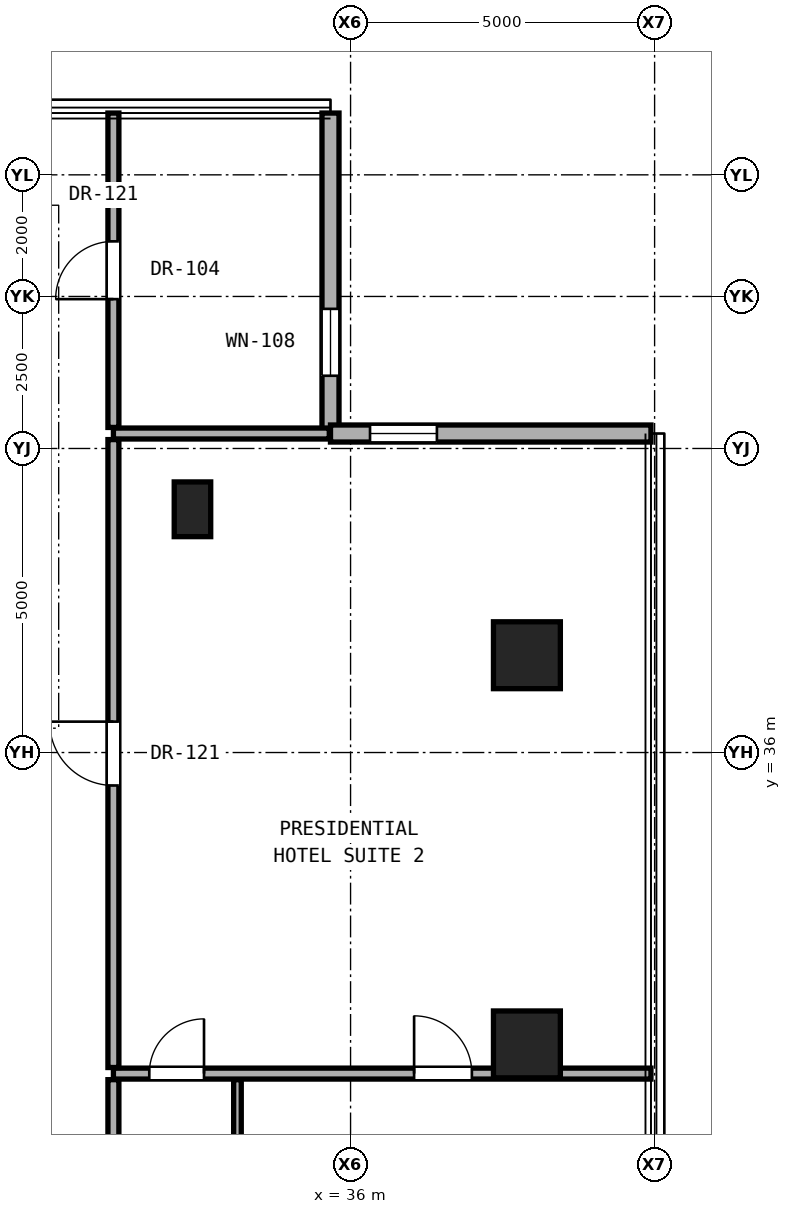
"""IFC4 building model, lengths in metres.
Left out: names, types, materials, properties, quantities, classifications, styles, units other than length and angle.
Written with IfcOpenShell. Run it as: python <this file> out.ifc"""

import sys

from ifc_helpers import new_model, si_unit, direction, frame, frame_2d, origin, origin_2d, place, context, subcontext, project, spatial, rectangle, hollow_rectangle, extrude, element, fill, save


model = new_model("IFC4")
c1 = context("Model", 3, precision=1e-05, world=origin(), true_north=direction((0.0, 1.0)))
c2 = subcontext(c1, "Body", "Model", "MODEL_VIEW")
j1 = project(units=[si_unit("LENGTHUNIT", "METRE"), si_unit("PLANEANGLEUNIT", "RADIAN")], contexts=[c1])
p1 = place(None, origin())
s1 = spatial("IfcSite", under=j1, at=p1, CompositionType="ELEMENT")
p2 = place(p1, origin())
s2 = spatial("IfcBuilding", under=s1, at=p2, CompositionType="ELEMENT")
p3 = place(p2, frame((0.0, 0.0, 124.7)))
s3 = spatial("IfcBuildingStorey", under=s2, at=p3, CompositionType="ELEMENT", Elevation=124.7)
for number, where, z_axis, x_axis in (
    (1, (38.9, 31.2, 0.0), (0.0, 0.0, 1.0), (1.0, 0.0, 0.0)),
    (2, (38.9, 37.6, 0.0), (0.0, 0.0, 1.0), (1.0, 0.0, 0.0)),
):
    element("IfcColumn", number, at=place(p3, frame(where, z_axis=z_axis, x_axis=x_axis)), inside=s3, PredefinedType="COLUMN", context=c2, shape_type="SweptSolid", body=[
        extrude(hollow_rectangle(XDim=1.1, YDim=1.1, WallThickness=0.06, at=origin_2d()), origin(), (0.0, 0.0, 1.0), 3.3),
    ])
p4 = place(p3, frame((33.4, 40.0, 0.0), z_axis=(0.0, 0.0, 1.0), x_axis=(1.0, 0.0, 0.0)))
e3 = element("IfcColumn", 3, at=p4, inside=s3, PredefinedType="PILASTER", context=c2, shape_type="SweptSolid", body=[
    extrude(rectangle(XDim=0.6, YDim=0.9, at=origin_2d()), origin(), (0.0, 0.0, 1.0), 3.3),
])
p5 = place(p3, frame((35.67, 41.246, 0.0), z_axis=(0.0, 0.0, 1.0), x_axis=(0.0, 1.0, 0.0)))
e4 = element("IfcWall", 4, at=p5, inside=s3, PredefinedType="SOLIDWALL", context=c2, shape_type="SweptSolid", body=[
    extrude(rectangle(XDim=5.27, YDim=0.28, at=frame_2d((2.635, 0.0))), origin(), (0.0, 0.0, 1.0), 3.06),
])
p6 = place(p5, frame((0.95, 0.0, 0.85)))
e5 = element("IfcOpeningElement", 5, at=p6, cuts=e4, PredefinedType="OPENING", context=c2, shape_type="SweptSolid", body=[
    extrude(rectangle(XDim=1.1, YDim=2.0, at=frame_2d((0.55, 1.0))), frame((0.0, 0.15, 0.0), z_axis=(0.0, -1.0, 0.0), x_axis=(1.0, 0.0, 0.0)), (0.0, 0.0, 1.0), 0.3),
])
p7 = place(p3, frame((40.94, 41.246, 0.0), z_axis=(0.0, 0.0, 1.0), x_axis=(-1.0, 0.0, 0.0)))
e6 = element("IfcWall", 6, at=p7, inside=s3, PredefinedType="SOLIDWALL", context=c2, shape_type="SweptSolid", body=[
    extrude(rectangle(XDim=5.27, YDim=0.28, at=frame_2d((2.635, 0.0))), origin(), (0.0, 0.0, 1.0), 3.06),
])
p8 = place(p7, frame((3.52, 0.0, 0.85)))
e7 = element("IfcOpeningElement", 7, at=p8, cuts=e6, PredefinedType="OPENING", context=c2, shape_type="SweptSolid", body=[
    extrude(rectangle(XDim=1.1, YDim=2.0, at=frame_2d((0.55, 1.0))), frame((0.0, 0.15, 0.0), z_axis=(0.0, -1.0, 0.0), x_axis=(1.0, 0.0, 0.0)), (0.0, 0.0, 1.0), 0.3),
])
p9 = place(p3, frame((32.1, 30.72, 0.0), z_axis=(0.0, 0.0, 1.0), x_axis=(1.0, 0.0, 0.0)))
e8 = element("IfcWall", 8, at=p9, inside=s3, PredefinedType="PARTITIONING", context=c2, shape_type="SweptSolid", body=[
    extrude(rectangle(XDim=8.84, YDim=0.18, at=frame_2d((4.42, 0.0))), origin(), (0.0, 0.0, 1.0), 2.299),
])
p10 = place(p9, frame((4.945, 0.0, 0.0)))
e9 = element("IfcOpeningElement", 9, at=p10, cuts=e8, PredefinedType="OPENING", context=c2, shape_type="SweptSolid", body=[
    extrude(rectangle(XDim=0.95, YDim=2.15, at=frame_2d((0.475, 1.075))), frame((0.0, 0.1, 0.0), z_axis=(0.0, -1.0, 0.0), x_axis=(1.0, 0.0, 0.0)), (0.0, 0.0, 1.0), 0.2),
])
p11 = place(p9, frame((0.59, 0.0, 0.0)))
e10 = element("IfcOpeningElement", 10, at=p11, cuts=e8, PredefinedType="OPENING", context=c2, shape_type="SweptSolid", body=[
    extrude(rectangle(XDim=0.9, YDim=2.1, at=frame_2d((0.45, 1.05))), frame((0.0, 0.1, 0.0), z_axis=(0.0, -1.0, 0.0), x_axis=(1.0, 0.0, 0.0)), (0.0, 0.0, 1.0), 0.2),
])
p12 = place(p3, frame((32.1, 41.246, 0.0), z_axis=(0.0, 0.0, 1.0), x_axis=(1.0, 0.0, 0.0)))
e11 = element("IfcWall", 11, at=p12, inside=s3, PredefinedType="PARTITIONING", context=c2, shape_type="SweptSolid", body=[
    extrude(rectangle(XDim=3.55, YDim=0.18, at=frame_2d((1.775, 0.0))), origin(), (0.0, 0.0, 1.0), 3.08),
])
p13 = place(p3, frame((32.1, 28.073, 0.0), z_axis=(0.0, 0.0, 1.0), x_axis=(0.0, 1.0, 0.0)))
e12 = element("IfcWall", 12, at=p13, inside=s3, PredefinedType="PARTITIONING", context=c2, shape_type="SweptSolid", body=[
    extrude(rectangle(XDim=2.548, YDim=0.18, at=frame_2d((1.274, 0.0))), origin(), (0.0, 0.0, 1.0), 3.08),
])
p14 = place(p3, frame((32.1, 30.82, 0.0), z_axis=(0.0, 0.0, 1.0), x_axis=(0.0, 1.0, 0.0)))
e13 = element("IfcWall", 13, at=p14, inside=s3, PredefinedType="PARTITIONING", context=c2, shape_type="SweptSolid", body=[
    extrude(rectangle(XDim=10.326, YDim=0.18, at=frame_2d((5.163, 0.0))), origin(), (0.0, 0.0, 1.0), 2.299),
])
p15 = place(p14, frame((4.638, 0.0, 0.0)))
e14 = element("IfcOpeningElement", 14, at=p15, cuts=e13, PredefinedType="OPENING", context=c2, shape_type="SweptSolid", body=[
    extrude(rectangle(XDim=1.05, YDim=2.2, at=frame_2d((0.525, 1.1))), frame((0.0, 0.1, 0.0), z_axis=(0.0, -1.0, 0.0), x_axis=(1.0, 0.0, 0.0)), (0.0, 0.0, 1.0), 0.2),
])
p16 = place(p3, frame((32.1, 41.346, 0.0), z_axis=(0.0, 0.0, 1.0), x_axis=(0.0, 1.0, 0.0)))
e15 = element("IfcWall", 15, at=p16, inside=s3, PredefinedType="PARTITIONING", context=c2, shape_type="SweptSolid", body=[
    extrude(rectangle(XDim=5.17, YDim=0.18, at=frame_2d((2.585, 0.0))), origin(), (0.0, 0.0, 1.0), 3.08),
])
p17 = place(p16, frame((2.11, 0.0, 0.0)))
e16 = element("IfcOpeningElement", 16, at=p17, cuts=e15, PredefinedType="OPENING", context=c2, shape_type="SweptSolid", body=[
    extrude(rectangle(XDim=0.95, YDim=2.15, at=frame_2d((0.475, 1.075))), frame((0.0, 0.1, 0.0), z_axis=(0.0, -1.0, 0.0), x_axis=(1.0, 0.0, 0.0)), (0.0, 0.0, 1.0), 0.2),
])
p18 = place(p3, frame((34.14, 28.073, 0.0), z_axis=(0.0, 0.0, 1.0), x_axis=(0.0, 1.0, 0.0)))
e17 = element("IfcWall", 17, at=p18, inside=s3, PredefinedType="PARTITIONING", context=c2, shape_type="SweptSolid", body=[
    extrude(rectangle(XDim=2.548, YDim=0.125, at=frame_2d((1.274, 0.0))), origin(), (0.0, 0.0, 1.0), 3.08),
])
p19 = place(p6, origin())
e18 = element("IfcWindow", 18, at=p19, inside=s3, PartitioningType="SINGLE_PANEL", PredefinedType="WINDOW", context=c2, shape_type="SweptSolid", body=[
    extrude(rectangle(XDim=1.1, YDim=2.0, at=frame_2d((0.55, 1.0))), frame((0.0, 0.03, 0.0), z_axis=(0.0, -1.0, 0.0), x_axis=(1.0, 0.0, 0.0)), (0.0, 0.0, 1.0), 0.06),
])
fill(e5, e18)
p20 = place(p8, origin())
e19 = element("IfcWindow", 19, at=p20, inside=s3, PartitioningType="SINGLE_PANEL", PredefinedType="WINDOW", context=c2, shape_type="SweptSolid", body=[
    extrude(rectangle(XDim=1.1, YDim=2.0, at=frame_2d((0.55, 1.0))), frame((0.0, 0.03, 0.0), z_axis=(0.0, -1.0, 0.0), x_axis=(1.0, 0.0, 0.0)), (0.0, 0.0, 1.0), 0.06),
])
fill(e7, e19)
p21 = place(p15, origin())
e20 = element("IfcDoor", 20, at=p21, inside=s3, OperationType="SINGLE_SWING_RIGHT", PredefinedType="DOOR", context=c2, shape_type="SweptSolid", body=[
    extrude(rectangle(XDim=1.05, YDim=2.2, at=frame_2d((0.525, 1.1))), frame((0.0, 0.025, 0.0), z_axis=(0.0, -1.0, 0.0), x_axis=(1.0, 0.0, 0.0)), (0.0, 0.0, 1.0), 0.05),
])
fill(e14, e20)
p22 = place(p10, origin())
e21 = element("IfcDoor", 21, at=p22, inside=s3, OperationType="SINGLE_SWING_LEFT", PredefinedType="DOOR", context=c2, shape_type="SweptSolid", body=[
    extrude(rectangle(XDim=0.95, YDim=2.15, at=frame_2d((0.475, 1.075))), frame((0.0, 0.025, 0.0), z_axis=(0.0, -1.0, 0.0), x_axis=(1.0, 0.0, 0.0)), (0.0, 0.0, 1.0), 0.05),
])
fill(e9, e21)
p23 = place(p11, origin())
e22 = element("IfcDoor", 22, at=p23, inside=s3, OperationType="SINGLE_SWING_RIGHT", PredefinedType="DOOR", context=c2, shape_type="SweptSolid", body=[
    extrude(rectangle(XDim=0.9, YDim=2.1, at=frame_2d((0.45, 1.05))), frame((0.0, 0.025, 0.0), z_axis=(0.0, -1.0, 0.0), x_axis=(1.0, 0.0, 0.0)), (0.0, 0.0, 1.0), 0.05),
])
fill(e10, e22)
p24 = place(p17, origin())
e23 = element("IfcDoor", 23, at=p24, inside=s3, OperationType="SINGLE_SWING_LEFT", PredefinedType="DOOR", context=c2, shape_type="SweptSolid", body=[
    extrude(rectangle(XDim=0.95, YDim=2.15, at=frame_2d((0.475, 1.075))), frame((0.0, 0.025, 0.0), z_axis=(0.0, -1.0, 0.0), x_axis=(1.0, 0.0, 0.0)), (0.0, 0.0, 1.0), 0.05),
])
fill(e16, e23)
save(model, sys.argv[1])
